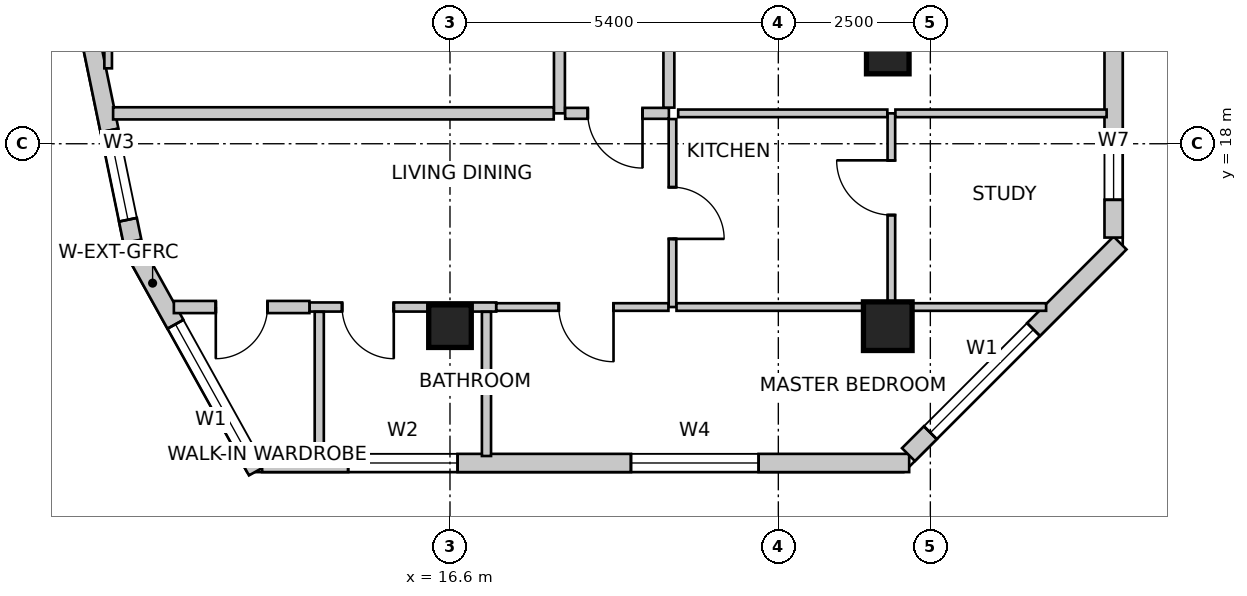
"""IFC4 building model, lengths in metres.
Left out: names, types, materials, properties, quantities, classifications, styles, units other than length and angle.
Written with IfcOpenShell. Run it as: python <this file> out.ifc"""

import sys

from ifc_helpers import new_model, si_unit, direction, frame, frame_2d, origin, origin_2d, place, context, subcontext, project, spatial, rectangle, extrude, source, transform, mapped, element, fill, save


model = new_model("IFC4")
c1 = context("Model", 3, precision=1e-05, world=origin(), true_north=direction((0.0, 1.0)))
c2 = subcontext(c1, "Body", "Model", "MODEL_VIEW")
j1 = project(units=[si_unit("LENGTHUNIT", "METRE"), si_unit("PLANEANGLEUNIT", "RADIAN")], contexts=[c1])
p1 = place(None, origin())
s1 = spatial("IfcSite", under=j1, at=p1, CompositionType="ELEMENT")
p2 = place(p1, origin())
s2 = spatial("IfcBuilding", under=s1, at=p2, CompositionType="ELEMENT")
p3 = place(p2, frame((0.0, 0.0, 197.4)))
s3 = spatial("IfcBuildingStorey", under=s2, at=p3, CompositionType="ELEMENT", Elevation=197.4)
m1 = source(origin(), c2, "Body", "SweptSolid", [
    extrude(rectangle(XDim=0.7, YDim=0.7, at=origin_2d()), origin(), (0.0, 0.0, 1.0), 3.5),
])
p4 = place(p3, frame((23.8, 19.5, 0.0), z_axis=(0.0, 0.0, 1.0), x_axis=(1.0, 0.0, 0.0)))
e1 = element("IfcColumn", 1, at=p4, inside=s3, PredefinedType="COLUMN", context=c2, shape_type="MappedRepresentation", body=[
    mapped(m1, transform((0.0, 0.0, 0.0), scale=1.0)),
])
m2 = source(origin(), c2, "Body", "SweptSolid", [
    extrude(rectangle(XDim=0.8, YDim=0.8, at=origin_2d()), origin(), (0.0, 0.0, 1.0), 3.5),
])
p5 = place(p3, frame((23.8, 15.0, 0.0), z_axis=(0.0, 0.0, 1.0), x_axis=(1.0, 0.0, 0.0)))
e2 = element("IfcColumn", 2, at=p5, inside=s3, PredefinedType="COLUMN", context=c2, shape_type="MappedRepresentation", body=[
    mapped(m2, transform((0.0, 0.0, 0.0), scale=1.0)),
])
p6 = place(p3, frame((16.6, 15.0, 0.0), z_axis=(0.0, 0.0, 1.0), x_axis=(1.0, 0.0, 0.0)))
e3 = element("IfcColumn", 3, at=p6, inside=s3, PredefinedType="COLUMN", context=c2, shape_type="MappedRepresentation", body=[
    mapped(m1, transform((0.0, 0.0, 0.0), scale=1.0)),
])
p7 = place(p3, frame((11.333, 16.384, 0.0), z_axis=(0.0, 0.0, 1.0), x_axis=(0.485633305139, -0.874162623852, 0.0)))
e4 = element("IfcWall", 4, at=p7, inside=s3, PredefinedType="SOLIDWALL", context=c2, shape_type="SweptSolid", body=[
    extrude(rectangle(XDim=4.307, YDim=0.3, at=frame_2d((2.153, 0.0))), origin(), (0.0, 0.0, 1.0), 3.25),
])
m3 = source(origin(), c2, "Body", "SweptSolid", [
    extrude(rectangle(XDim=2.4, YDim=2.2, at=frame_2d((1.2, 1.1))), frame((0.0, 0.16, 0.0), z_axis=(0.0, -1.0, 0.0), x_axis=(1.0, 0.0, 0.0)), (0.0, 0.0, 1.0), 0.32),
])
p8 = place(p7, frame((1.547, 0.0, 0.85)))
e5 = element("IfcOpeningElement", 5, at=p8, cuts=e4, PredefinedType="OPENING", context=c2, shape_type="MappedRepresentation", body=[
    mapped(m3, transform((0.0, 0.0, 0.0), scale=1.0)),
])
p9 = place(p3, frame((13.51, 12.75, 0.0), z_axis=(0.0, 0.0, 1.0), x_axis=(1.0, 0.0, 0.0)))
e6 = element("IfcWall", 6, at=p9, inside=s3, PredefinedType="SOLIDWALL", context=c2, shape_type="SweptSolid", body=[
    extrude(rectangle(XDim=10.642, YDim=0.3, at=frame_2d((5.321, 0.0))), origin(), (0.0, 0.0, 1.0), 3.25),
])
m4 = source(origin(), c2, "Body", "SweptSolid", [
    extrude(rectangle(XDim=1.8, YDim=2.1, at=frame_2d((0.9, 1.05))), frame((0.0, 0.16, 0.0), z_axis=(0.0, -1.0, 0.0), x_axis=(1.0, 0.0, 0.0)), (0.0, 0.0, 1.0), 0.32),
])
p10 = place(p9, frame((1.415, 0.0, 0.85)))
e7 = element("IfcOpeningElement", 7, at=p10, cuts=e6, PredefinedType="OPENING", context=c2, shape_type="MappedRepresentation", body=[
    mapped(m4, transform((0.0, 0.0, 0.0), scale=1.0)),
])
m5 = source(origin(), c2, "Body", "SweptSolid", [
    extrude(rectangle(XDim=2.1, YDim=2.0, at=frame_2d((1.05, 1.0))), frame((0.0, 0.16, 0.0), z_axis=(0.0, -1.0, 0.0), x_axis=(1.0, 0.0, 0.0)), (0.0, 0.0, 1.0), 0.32),
])
p11 = place(p9, frame((6.066, 0.0, 0.85)))
e8 = element("IfcOpeningElement", 8, at=p11, cuts=e6, PredefinedType="OPENING", context=c2, shape_type="MappedRepresentation", body=[
    mapped(m5, transform((0.0, 0.0, 0.0), scale=1.0)),
])
p12 = place(p3, frame((24.14, 12.888, 0.0), z_axis=(0.0, 0.0, 1.0), x_axis=(0.707106781187, 0.707106781187, 0.0)))
e9 = element("IfcWall", 9, at=p12, inside=s3, PredefinedType="SOLIDWALL", context=c2, shape_type="SweptSolid", body=[
    extrude(rectangle(XDim=4.922, YDim=0.3, at=frame_2d((2.461, 0.0))), origin(), (0.0, 0.0, 1.0), 3.25),
])
p13 = place(p12, frame((0.509, 0.0, 0.85)))
e10 = element("IfcOpeningElement", 10, at=p13, cuts=e9, PredefinedType="OPENING", context=c2, shape_type="MappedRepresentation", body=[
    mapped(m3, transform((0.0, 0.0, 0.0), scale=1.0)),
])
p14 = place(p3, frame((27.514, 16.457, 0.0), z_axis=(0.0, 0.0, 1.0), x_axis=(0.0, 1.0, 0.0)))
e11 = element("IfcWall", 11, at=p14, inside=s3, PredefinedType="SOLIDWALL", context=c2, shape_type="SweptSolid", body=[
    extrude(rectangle(XDim=13.679, YDim=0.3, at=frame_2d((6.839, 0.0))), origin(), (0.0, 0.0, 1.0), 3.25),
])
m6 = source(origin(), c2, "Body", "SweptSolid", [
    extrude(rectangle(XDim=1.6, YDim=2.15, at=frame_2d((0.8, 1.075))), frame((0.0, 0.16, 0.0), z_axis=(0.0, -1.0, 0.0), x_axis=(1.0, 0.0, 0.0)), (0.0, 0.0, 1.0), 0.32),
])
p15 = place(p14, frame((8.993, 0.0, 0.0)))
e12 = element("IfcOpeningElement", 12, at=p15, cuts=e11, PredefinedType="OPENING", context=c2, shape_type="MappedRepresentation", body=[
    mapped(m6, transform((0.0, 0.0, 0.0), scale=1.0)),
])
m7 = source(origin(), c2, "Body", "SweptSolid", [
    extrude(rectangle(XDim=0.9, YDim=1.6, at=frame_2d((0.45, 0.8))), frame((0.0, 0.16, 0.0), z_axis=(0.0, -1.0, 0.0), x_axis=(1.0, 0.0, 0.0)), (0.0, 0.0, 1.0), 0.32),
])
p16 = place(p14, frame((0.621, 0.0, 0.85)))
e13 = element("IfcOpeningElement", 13, at=p16, cuts=e11, PredefinedType="OPENING", context=c2, shape_type="MappedRepresentation", body=[
    mapped(m7, transform((0.0, 0.0, 0.0), scale=1.0)),
])
p17 = place(p14, frame((4.438, 0.0, 0.85)))
e14 = element("IfcOpeningElement", 14, at=p17, cuts=e11, PredefinedType="OPENING", context=c2, shape_type="MappedRepresentation", body=[
    mapped(m5, transform((0.0, 0.0, 0.0), scale=1.0)),
])
p18 = place(p14, frame((11.066, 0.0, 0.85)))
e15 = element("IfcOpeningElement", 15, at=p18, cuts=e11, PredefinedType="OPENING", context=c2, shape_type="MappedRepresentation", body=[
    mapped(m5, transform((0.0, 0.0, 0.0), scale=1.0)),
])
p19 = place(p3, frame((8.188, 31.834, 0.0), z_axis=(0.0, 0.0, 1.0), x_axis=(0.202303475707, -0.979322880217, 0.0)))
e16 = element("IfcWall", 16, at=p19, inside=s3, PredefinedType="SOLIDWALL", context=c2, shape_type="SweptSolid", body=[
    extrude(rectangle(XDim=15.766, YDim=0.3, at=frame_2d((7.883, 0.0))), origin(), (0.0, 0.0, 1.0), 3.25),
])
p20 = place(p19, frame((2.249, 0.0, 0.85)))
e17 = element("IfcOpeningElement", 17, at=p20, cuts=e16, PredefinedType="OPENING", context=c2, shape_type="MappedRepresentation", body=[
    mapped(m3, transform((0.0, 0.0, 0.0), scale=1.0)),
])
p21 = place(p19, frame((8.648, 0.0, 0.85)))
e18 = element("IfcOpeningElement", 18, at=p21, cuts=e16, PredefinedType="OPENING", context=c2, shape_type="MappedRepresentation", body=[
    mapped(m3, transform((0.0, 0.0, 0.0), scale=1.0)),
])
m8 = source(origin(), c2, "Body", "SweptSolid", [
    extrude(rectangle(XDim=1.5, YDim=1.8, at=frame_2d((0.75, 0.9))), frame((0.0, 0.16, 0.0), z_axis=(0.0, -1.0, 0.0), x_axis=(1.0, 0.0, 0.0)), (0.0, 0.0, 1.0), 0.32),
])
p22 = place(p19, frame((13.902, 0.0, 0.85)))
e19 = element("IfcOpeningElement", 19, at=p22, cuts=e16, PredefinedType="OPENING", context=c2, shape_type="MappedRepresentation", body=[
    mapped(m8, transform((0.0, 0.0, 0.0), scale=1.0)),
])
p23 = place(p3, frame((18.4, 18.5, 0.0), z_axis=(0.0, 0.0, 1.0), x_axis=(0.0, 1.0, 0.0)))
e20 = element("IfcWall", 20, at=p23, inside=s3, PredefinedType="PARTITIONING", context=c2, shape_type="SweptSolid", body=[
    extrude(rectangle(XDim=6.86, YDim=0.18, at=frame_2d((3.43, 0.0))), origin(), (0.0, 0.0, 1.0), 2.766),
])
m9 = source(origin(), c2, "Body", "SweptSolid", [
    extrude(rectangle(XDim=0.9, YDim=2.15, at=frame_2d((0.45, 1.075))), frame((0.0, 0.1, 0.0), z_axis=(0.0, -1.0, 0.0), x_axis=(1.0, 0.0, 0.0)), (0.0, 0.0, 1.0), 0.2),
])
p24 = place(p23, frame((2.98, 0.0, 0.0)))
e21 = element("IfcOpeningElement", 21, at=p24, cuts=e20, PredefinedType="OPENING", context=c2, shape_type="MappedRepresentation", body=[
    mapped(m9, transform((0.0, 0.0, 0.0), scale=1.0)),
])
p25 = place(p3, frame((20.2, 18.5, 0.0), z_axis=(0.0, 0.0, 1.0), x_axis=(-1.0, 0.0, 0.0)))
e22 = element("IfcWall", 22, at=p25, inside=s3, PredefinedType="PARTITIONING", context=c2, shape_type="SweptSolid", body=[
    extrude(rectangle(XDim=1.706, YDim=0.18, at=frame_2d((0.853, 0.0))), origin(), (0.0, 0.0, 1.0), 3.25),
])
p26 = place(p25, frame((0.434, 0.0, 0.0)))
e23 = element("IfcOpeningElement", 23, at=p26, cuts=e22, PredefinedType="OPENING", context=c2, shape_type="MappedRepresentation", body=[
    mapped(m9, transform((0.0, 0.0, 0.0), scale=1.0)),
])
p27 = place(p3, frame((20.2, 31.806, 0.0), z_axis=(0.0, 0.0, 1.0), x_axis=(0.0, -1.0, 0.0)))
e24 = element("IfcWall", 24, at=p27, inside=s3, PredefinedType="PARTITIONING", context=c2, shape_type="SweptSolid", body=[
    extrude(rectangle(XDim=13.212, YDim=0.18, at=frame_2d((6.606, 0.0))), origin(), (0.0, 0.0, 1.0), 2.766),
])
p28 = place(p27, frame((6.095, 0.0, 0.0)))
e25 = element("IfcOpeningElement", 25, at=p28, cuts=e24, PredefinedType="OPENING", context=c2, shape_type="MappedRepresentation", body=[
    mapped(m9, transform((0.0, 0.0, 0.0), scale=1.0)),
])
p29 = place(p3, frame((10.978, 19.24, 0.0), z_axis=(0.0, 0.0, 1.0), x_axis=(0.0, 1.0, 0.0)))
e26 = element("IfcWall", 26, at=p29, inside=s3, PredefinedType="PARTITIONING", context=c2, shape_type="SweptSolid", body=[
    extrude(rectangle(XDim=5.96, YDim=0.125, at=frame_2d((2.98, 0.0))), origin(), (0.0, 0.0, 1.0), 2.542),
])
m10 = source(origin(), c2, "Body", "SweptSolid", [
    extrude(rectangle(XDim=0.85, YDim=2.15, at=frame_2d((0.425, 1.075))), frame((0.0, 0.073, 0.0), z_axis=(0.0, -1.0, 0.0), x_axis=(1.0, 0.0, 0.0)), (0.0, 0.0, 1.0), 0.145),
])
p30 = place(p29, frame((2.125, 0.0, 0.0)))
e27 = element("IfcOpeningElement", 27, at=p30, cuts=e26, PredefinedType="OPENING", context=c2, shape_type="MappedRepresentation", body=[
    mapped(m10, transform((0.0, 0.0, 0.0), scale=1.0)),
])
p31 = place(p3, frame((18.306, 18.5, 0.0), z_axis=(0.0, 0.0, 1.0), x_axis=(-1.0, 0.0, 0.0)))
e28 = element("IfcWall", 28, at=p31, inside=s3, PredefinedType="PARTITIONING", context=c2, shape_type="SweptSolid", body=[
    extrude(rectangle(XDim=7.246, YDim=0.2, at=frame_2d((3.623, 0.0))), origin(), (0.0, 0.0, 1.0), 3.25),
])
p32 = place(p3, frame((23.859, 15.315, 0.0), z_axis=(0.0, 0.0, 1.0), x_axis=(0.0, 1.0, 0.0)))
e29 = element("IfcWall", 29, at=p32, inside=s3, PredefinedType="PARTITIONING", context=c2, shape_type="SweptSolid", body=[
    extrude(rectangle(XDim=3.185, YDim=0.125, at=frame_2d((1.593, 0.0))), origin(), (0.0, 0.0, 1.0), 2.542),
])
m11 = source(origin(), c2, "Body", "SweptSolid", [
    extrude(rectangle(XDim=0.9, YDim=2.15, at=frame_2d((0.45, 1.075))), frame((0.0, 0.073, 0.0), z_axis=(0.0, -1.0, 0.0), x_axis=(1.0, 0.0, 0.0)), (0.0, 0.0, 1.0), 0.145),
])
p33 = place(p32, frame((1.512, 0.0, 0.0)))
e30 = element("IfcOpeningElement", 30, at=p33, cuts=e29, PredefinedType="OPENING", context=c2, shape_type="MappedRepresentation", body=[
    mapped(m11, transform((0.0, 0.0, 0.0), scale=1.0)),
])
p34 = place(p3, frame((26.404, 15.315, 0.0), z_axis=(0.0, 0.0, 1.0), x_axis=(-1.0, 0.0, 0.0)))
e31 = element("IfcWall", 31, at=p34, inside=s3, PredefinedType="PARTITIONING", context=c2, shape_type="SweptSolid", body=[
    extrude(rectangle(XDim=2.479, YDim=0.125, at=frame_2d((1.239, 0.0))), origin(), (0.0, 0.0, 1.0), 3.25),
])
p35 = place(p3, frame((23.926, 18.5, 0.0), z_axis=(0.0, 0.0, 1.0), x_axis=(1.0, 0.0, 0.0)))
e32 = element("IfcWall", 32, at=p35, inside=s3, PredefinedType="PARTITIONING", context=c2, shape_type="SweptSolid", body=[
    extrude(rectangle(XDim=3.473, YDim=0.125, at=frame_2d((1.737, 0.0))), origin(), (0.0, 0.0, 1.0), 3.25),
])
p36 = place(p3, frame((20.259, 18.406, 0.0), z_axis=(0.0, 0.0, 1.0), x_axis=(0.0, -1.0, 0.0)))
e33 = element("IfcWall", 33, at=p36, inside=s3, PredefinedType="PARTITIONING", context=c2, shape_type="SweptSolid", body=[
    extrude(rectangle(XDim=3.091, YDim=0.125, at=frame_2d((1.545, 0.0))), origin(), (0.0, 0.0, 1.0), 2.779),
])
p37 = place(p36, frame((1.121, 0.0, 0.0)))
e34 = element("IfcOpeningElement", 34, at=p37, cuts=e33, PredefinedType="OPENING", context=c2, shape_type="MappedRepresentation", body=[
    mapped(m10, transform((0.0, 0.0, 0.0), scale=1.0)),
])
p38 = place(p3, frame((17.36, 15.315, 0.0), z_axis=(0.0, 0.0, 1.0), x_axis=(-1.0, 0.0, 0.0)))
e35 = element("IfcWall", 35, at=p38, inside=s3, PredefinedType="PARTITIONING", context=c2, shape_type="SweptSolid", body=[
    extrude(rectangle(XDim=3.07, YDim=0.15, at=frame_2d((1.535, 0.0))), origin(), (0.0, 0.0, 1.0), 2.779),
])
m12 = source(origin(), c2, "Body", "SweptSolid", [
    extrude(rectangle(XDim=0.85, YDim=2.15, at=frame_2d((0.425, 1.075))), frame((0.0, 0.085, 0.0), z_axis=(0.0, -1.0, 0.0), x_axis=(1.0, 0.0, 0.0)), (0.0, 0.0, 1.0), 0.17),
])
p39 = place(p38, frame((1.685, 0.0, 0.0)))
e36 = element("IfcOpeningElement", 36, at=p39, cuts=e35, PredefinedType="OPENING", context=c2, shape_type="MappedRepresentation", body=[
    mapped(m12, transform((0.0, 0.0, 0.0), scale=1.0)),
])
p40 = place(p3, frame((14.288, 15.315, 0.0), z_axis=(0.0, 0.0, 1.0), x_axis=(-1.0, 0.0, 0.0)))
e37 = element("IfcWall", 37, at=p40, inside=s3, PredefinedType="PARTITIONING", context=c2, shape_type="SweptSolid", body=[
    extrude(rectangle(XDim=2.229, YDim=0.2, at=frame_2d((1.115, 0.0))), origin(), (0.0, 0.0, 1.0), 3.25),
])
m13 = source(origin(), c2, "Body", "SweptSolid", [
    extrude(rectangle(XDim=0.85, YDim=2.15, at=frame_2d((0.425, 1.075))), frame((0.0, 0.11, 0.0), z_axis=(0.0, -1.0, 0.0), x_axis=(1.0, 0.0, 0.0)), (0.0, 0.0, 1.0), 0.22),
])
p41 = place(p40, frame((0.69, 0.0, 0.0)))
e38 = element("IfcOpeningElement", 38, at=p41, cuts=e37, PredefinedType="OPENING", context=c2, shape_type="MappedRepresentation", body=[
    mapped(m13, transform((0.0, 0.0, 0.0), scale=1.0)),
])
p42 = place(p3, frame((20.192, 15.315, 0.0), z_axis=(0.0, 0.0, 1.0), x_axis=(-1.0, 0.0, 0.0)))
e39 = element("IfcWall", 39, at=p42, inside=s3, PredefinedType="PARTITIONING", context=c2, shape_type="SweptSolid", body=[
    extrude(rectangle(XDim=2.83, YDim=0.125, at=frame_2d((1.415, 0.0))), origin(), (0.0, 0.0, 1.0), 3.25),
])
p43 = place(p42, frame((0.903, 0.0, 0.0)))
e40 = element("IfcOpeningElement", 40, at=p43, cuts=e39, PredefinedType="OPENING", context=c2, shape_type="MappedRepresentation", body=[
    mapped(m11, transform((0.0, 0.0, 0.0), scale=1.0)),
])
p44 = place(p3, frame((23.792, 15.315, 0.0), z_axis=(0.0, 0.0, 1.0), x_axis=(-1.0, 0.0, 0.0)))
e41 = element("IfcWall", 41, at=p44, inside=s3, PredefinedType="PARTITIONING", context=c2, shape_type="SweptSolid", body=[
    extrude(rectangle(XDim=3.467, YDim=0.125, at=frame_2d((1.733, 0.0))), origin(), (0.0, 0.0, 1.0), 2.542),
])
p45 = place(p3, frame((20.353, 18.5, 0.0), z_axis=(0.0, 0.0, 1.0), x_axis=(1.0, 0.0, 0.0)))
e42 = element("IfcWall", 42, at=p45, inside=s3, PredefinedType="PARTITIONING", context=c2, shape_type="SweptSolid", body=[
    extrude(rectangle(XDim=3.439, YDim=0.125, at=frame_2d((1.72, 0.0))), origin(), (0.0, 0.0, 1.0), 2.542),
])
p46 = place(p3, frame((14.45, 12.865, 0.0), z_axis=(0.0, 0.0, 1.0), x_axis=(0.0, 1.0, 0.0)))
e43 = element("IfcWall", 43, at=p46, inside=s3, PredefinedType="PARTITIONING", context=c2, shape_type="SweptSolid", body=[
    extrude(rectangle(XDim=2.371, YDim=0.15, at=frame_2d((1.186, 0.0))), origin(), (0.0, 0.0, 1.0), 3.25),
])
p47 = place(p3, frame((17.2, 15.236, 0.0), z_axis=(0.0, 0.0, 1.0), x_axis=(0.0, -1.0, 0.0)))
e44 = element("IfcWall", 44, at=p47, inside=s3, PredefinedType="PARTITIONING", context=c2, shape_type="SweptSolid", body=[
    extrude(rectangle(XDim=2.371, YDim=0.15, at=frame_2d((1.186, 0.0))), origin(), (0.0, 0.0, 1.0), 2.542),
])
m14 = source(origin(), c2, "Body", "SweptSolid", [
    extrude(rectangle(XDim=2.4, YDim=2.2, at=frame_2d((1.2, 1.1))), frame((0.0, -0.015, 0.0), z_axis=(0.0, -1.0, 0.0), x_axis=(1.0, 0.0, 0.0)), (0.0, 0.0, 1.0), 0.06),
])
p48 = place(p8, origin())
e45 = element("IfcWindow", 45, at=p48, inside=s3, PartitioningType="SINGLE_PANEL", PredefinedType="WINDOW", context=c2, shape_type="MappedRepresentation", body=[
    mapped(m14, transform((0.0, 0.0, 0.0), scale=1.0)),
])
fill(e5, e45)
m15 = source(origin(), c2, "Body", "SweptSolid", [
    extrude(rectangle(XDim=1.8, YDim=2.1, at=frame_2d((0.9, 1.05))), frame((0.0, -0.015, 0.0), z_axis=(0.0, -1.0, 0.0), x_axis=(1.0, 0.0, 0.0)), (0.0, 0.0, 1.0), 0.06),
])
p49 = place(p10, origin())
e46 = element("IfcWindow", 46, at=p49, inside=s3, PartitioningType="SINGLE_PANEL", PredefinedType="WINDOW", context=c2, shape_type="MappedRepresentation", body=[
    mapped(m15, transform((0.0, 0.0, 0.0), scale=1.0)),
])
fill(e7, e46)
m16 = source(origin(), c2, "Body", "SweptSolid", [
    extrude(rectangle(XDim=2.1, YDim=2.0, at=frame_2d((1.05, 1.0))), frame((0.0, -0.015, 0.0), z_axis=(0.0, -1.0, 0.0), x_axis=(1.0, 0.0, 0.0)), (0.0, 0.0, 1.0), 0.06),
])
p50 = place(p11, origin())
e47 = element("IfcWindow", 47, at=p50, inside=s3, PartitioningType="SINGLE_PANEL", PredefinedType="WINDOW", context=c2, shape_type="MappedRepresentation", body=[
    mapped(m16, transform((0.0, 0.0, 0.0), scale=1.0)),
])
fill(e8, e47)
p51 = place(p13, origin())
e48 = element("IfcWindow", 48, at=p51, inside=s3, PartitioningType="SINGLE_PANEL", PredefinedType="WINDOW", context=c2, shape_type="MappedRepresentation", body=[
    mapped(m14, transform((0.0, 0.0, 0.0), scale=1.0)),
])
fill(e10, e48)
m17 = source(origin(), c2, "Body", "SweptSolid", [
    extrude(rectangle(XDim=0.9, YDim=1.6, at=frame_2d((0.45, 0.8))), frame((0.0, -0.015, 0.0), z_axis=(0.0, -1.0, 0.0), x_axis=(1.0, 0.0, 0.0)), (0.0, 0.0, 1.0), 0.06),
])
p52 = place(p16, origin())
e49 = element("IfcWindow", 49, at=p52, inside=s3, PartitioningType="SINGLE_PANEL", PredefinedType="WINDOW", context=c2, shape_type="MappedRepresentation", body=[
    mapped(m17, transform((0.0, 0.0, 0.0), scale=1.0)),
])
fill(e13, e49)
m18 = source(origin(), c2, "Body", "SweptSolid", [
    extrude(rectangle(XDim=1.5, YDim=1.8, at=frame_2d((0.75, 0.9))), frame((0.0, -0.015, 0.0), z_axis=(0.0, -1.0, 0.0), x_axis=(1.0, 0.0, 0.0)), (0.0, 0.0, 1.0), 0.06),
])
p53 = place(p22, origin())
e50 = element("IfcWindow", 50, at=p53, inside=s3, PartitioningType="SINGLE_PANEL", PredefinedType="WINDOW", context=c2, shape_type="MappedRepresentation", body=[
    mapped(m18, transform((0.0, 0.0, 0.0), scale=1.0)),
])
fill(e19, e50)
m19 = source(origin(), c2, "Body", "SweptSolid", [
    extrude(rectangle(XDim=0.9, YDim=2.15, at=frame_2d((0.45, 1.075))), frame((0.0, 0.025, 0.0), z_axis=(0.0, -1.0, 0.0), x_axis=(1.0, 0.0, 0.0)), (0.0, 0.0, 1.0), 0.05),
])
p54 = place(p33, origin())
e51 = element("IfcDoor", 51, at=p54, inside=s3, OperationType="SINGLE_SWING_RIGHT", PredefinedType="DOOR", context=c2, shape_type="MappedRepresentation", body=[
    mapped(m19, transform((0.0, 0.0, 0.0), scale=1.0)),
])
fill(e30, e51)
m20 = source(origin(), c2, "Body", "SweptSolid", [
    extrude(rectangle(XDim=0.9, YDim=2.15, at=frame_2d((0.45, 1.075))), frame((0.0, 0.025, 0.0), z_axis=(0.0, -1.0, 0.0), x_axis=(1.0, 0.0, 0.0)), (0.0, 0.0, 1.0), 0.05),
])
p55 = place(p26, origin())
e52 = element("IfcDoor", 52, at=p55, inside=s3, OperationType="SINGLE_SWING_LEFT", PredefinedType="DOOR", context=c2, shape_type="MappedRepresentation", body=[
    mapped(m20, transform((0.0, 0.0, 0.0), scale=1.0)),
])
fill(e23, e52)
m21 = source(origin(), c2, "Body", "SweptSolid", [
    extrude(rectangle(XDim=0.85, YDim=2.15, at=frame_2d((0.425, 1.075))), frame((0.0, 0.025, 0.0), z_axis=(0.0, -1.0, 0.0), x_axis=(1.0, 0.0, 0.0)), (0.0, 0.0, 1.0), 0.05),
])
p56 = place(p37, origin())
e53 = element("IfcDoor", 53, at=p56, inside=s3, OperationType="SINGLE_SWING_RIGHT", PredefinedType="DOOR", context=c2, shape_type="MappedRepresentation", body=[
    mapped(m21, transform((0.0, 0.0, 0.0), scale=1.0)),
])
fill(e34, e53)
p57 = place(p39, origin())
e54 = element("IfcDoor", 54, at=p57, inside=s3, OperationType="SINGLE_SWING_LEFT", PredefinedType="DOOR", context=c2, shape_type="MappedRepresentation", body=[
    mapped(m21, transform((0.0, 0.0, 0.0), scale=1.0)),
])
fill(e36, e54)
p58 = place(p41, origin())
e55 = element("IfcDoor", 55, at=p58, inside=s3, OperationType="SINGLE_SWING_RIGHT", PredefinedType="DOOR", context=c2, shape_type="MappedRepresentation", body=[
    mapped(m21, transform((0.0, 0.0, 0.0), scale=1.0)),
])
fill(e38, e55)
p59 = place(p43, origin())
e56 = element("IfcDoor", 56, at=p59, inside=s3, OperationType="SINGLE_SWING_LEFT", PredefinedType="DOOR", context=c2, shape_type="MappedRepresentation", body=[
    mapped(m19, transform((0.0, 0.0, 0.0), scale=1.0)),
])
fill(e40, e56)
save(model, sys.argv[1])
